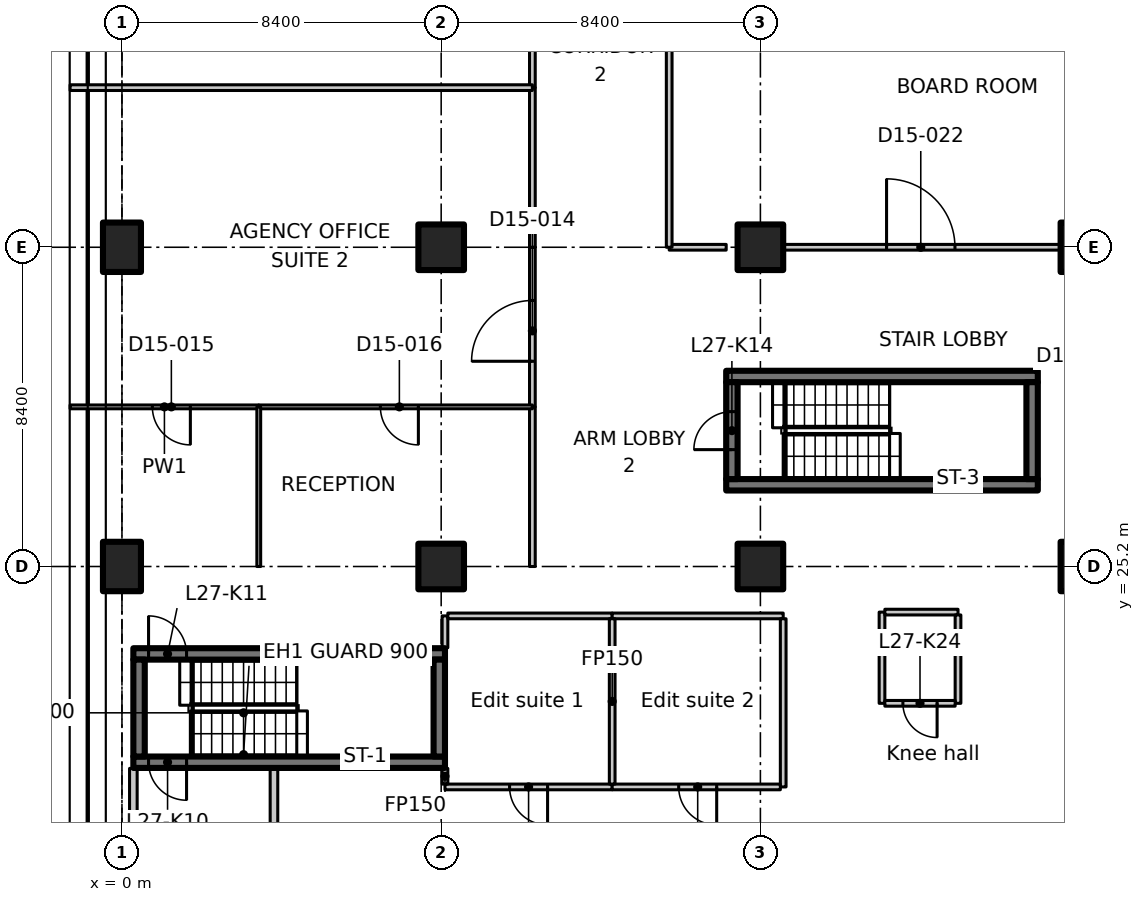
"""IFC4 building model, lengths in metres.
Left out: names, types, materials, properties, quantities, classifications, styles, units other than length and angle.
Written with IfcOpenShell. Run it as: python <this file> out.ifc"""

import sys

from ifc_helpers import new_model, si_unit, direction, frame, frame_2d, origin, origin_2d, place, context, subcontext, project, spatial, polyline, rectangle, outline, extrude, element, fill, save


model = new_model("IFC4")
c1 = context("Model", 3, precision=1e-05, world=origin(), true_north=direction((0.0, 1.0)))
c2 = subcontext(c1, "Body", "Model", "MODEL_VIEW")
j1 = project(units=[si_unit("LENGTHUNIT", "METRE"), si_unit("PLANEANGLEUNIT", "RADIAN")], contexts=[c1])
p1 = place(None, origin())
s1 = spatial("IfcSite", under=j1, at=p1, CompositionType="ELEMENT")
p2 = place(p1, origin())
s2 = spatial("IfcBuilding", under=s1, at=p2, CompositionType="ELEMENT")
p3 = place(p2, frame((0.0, 0.0, 113.3)))
s3 = spatial("IfcBuildingStorey", under=s2, at=p3, CompositionType="ELEMENT", Elevation=113.3)
for number, where, z_axis, x_axis in (
    (1, (0.0, 25.2, 0.0), (0.0, 0.0, 1.0), (1.0, 0.0, 0.0)),
    (2, (0.0, 33.6, 0.0), (0.0, 0.0, 1.0), (1.0, 0.0, 0.0)),
):
    element("IfcColumn", number, at=place(p3, frame(where, z_axis=z_axis, x_axis=x_axis)), inside=s3, PredefinedType="COLUMN", context=c2, shape_type="SweptSolid", body=[
        extrude(rectangle(XDim=1.0, YDim=1.3, at=origin_2d()), origin(), (0.0, 0.0, 1.0), 3.35),
    ])
for number, where, z_axis, x_axis in (
    (3, (8.4, 25.2, 0.0), (0.0, 0.0, 1.0), (1.0, 0.0, 0.0)),
    (4, (8.4, 33.6, 0.0), (0.0, 0.0, 1.0), (1.0, 0.0, 0.0)),
    (5, (16.8, 25.2, 0.0), (0.0, 0.0, 1.0), (1.0, 0.0, 0.0)),
    (6, (16.8, 33.6, 0.0), (0.0, 0.0, 1.0), (1.0, 0.0, 0.0)),
):
    element("IfcColumn", number, at=place(p3, frame(where, z_axis=z_axis, x_axis=x_axis)), inside=s3, PredefinedType="COLUMN", context=c2, shape_type="SweptSolid", body=[
        extrude(rectangle(XDim=1.2, YDim=1.2, at=origin_2d()), origin(), (0.0, 0.0, 1.0), 3.35),
    ])
for number, where, z_axis, x_axis in (
    (7, (25.2, 25.2, 0.0), (0.0, 0.0, 1.0), (1.0, 0.0, 0.0)),
    (8, (25.2, 33.6, 0.0), (0.0, 0.0, 1.0), (1.0, 0.0, 0.0)),
):
    element("IfcColumn", number, at=place(p3, frame(where, z_axis=z_axis, x_axis=x_axis)), inside=s3, PredefinedType="COLUMN", context=c2, shape_type="SweptSolid", body=[
        extrude(rectangle(XDim=1.0, YDim=1.3, at=origin_2d()), origin(), (0.0, 0.0, 1.0), 3.35),
    ])
p4 = place(p3, frame((8.5, 20.05, 0.0), z_axis=(0.0, 0.0, 1.0), x_axis=(-1.0, 0.0, 0.0)))
e9 = element("IfcWall", 9, at=p4, inside=s3, PredefinedType="SHEAR", context=c2, shape_type="SweptSolid", body=[
    extrude(rectangle(XDim=8.2, YDim=0.3, at=frame_2d((4.1, 0.0))), origin(), (0.0, 0.0, 1.0), 3.35),
])
p5 = place(p4, frame((6.8, 0.0, 0.0)))
e10 = element("IfcOpeningElement", 10, at=p5, cuts=e9, PredefinedType="OPENING", context=c2, shape_type="SweptSolid", body=[
    extrude(rectangle(XDim=1.0, YDim=2.1, at=frame_2d((0.5, 1.05))), frame((0.0, 0.16, 0.0), z_axis=(0.0, -1.0, 0.0), x_axis=(1.0, 0.0, 0.0)), (0.0, 0.0, 1.0), 0.32),
])
p6 = place(p3, frame((0.3, 22.9, 0.0), z_axis=(0.0, 0.0, 1.0), x_axis=(1.0, 0.0, 0.0)))
e11 = element("IfcWall", 11, at=p6, inside=s3, PredefinedType="SHEAR", context=c2, shape_type="SweptSolid", body=[
    extrude(rectangle(XDim=8.2, YDim=0.3, at=frame_2d((4.1, 0.0))), origin(), (0.0, 0.0, 1.0), 3.35),
])
p7 = place(p6, frame((0.4, 0.0, 0.0)))
e12 = element("IfcOpeningElement", 12, at=p7, cuts=e11, PredefinedType="OPENING", context=c2, shape_type="SweptSolid", body=[
    extrude(rectangle(XDim=1.0, YDim=2.1, at=frame_2d((0.5, 1.05))), frame((0.0, 0.16, 0.0), z_axis=(0.0, -1.0, 0.0), x_axis=(1.0, 0.0, 0.0)), (0.0, 0.0, 1.0), 0.32),
])
for number, where, z_axis, x_axis in (
    (13, (0.45, 20.2, 0.0), (0.0, 0.0, 1.0), (0.0, 1.0, 0.0)),
    (14, (8.35, 20.2, 0.0), (0.0, 0.0, 1.0), (0.0, 1.0, 0.0)),
):
    element("IfcWall", number, at=place(p3, frame(where, z_axis=z_axis, x_axis=x_axis)), inside=s3, PredefinedType="SHEAR", context=c2, shape_type="SweptSolid", body=[
        extrude(rectangle(XDim=2.55, YDim=0.3, at=frame_2d((1.275, 0.0))), origin(), (0.0, 0.0, 1.0), 3.35),
    ])
for number, where, z_axis, x_axis in (
    (15, (15.9, 27.35, 0.0), (0.0, 0.0, 1.0), (1.0, 0.0, 0.0)),
    (16, (15.9, 30.2, 0.0), (0.0, 0.0, 1.0), (1.0, 0.0, 0.0)),
):
    element("IfcWall", number, at=place(p3, frame(where, z_axis=z_axis, x_axis=x_axis)), inside=s3, PredefinedType="SHEAR", context=c2, shape_type="SweptSolid", body=[
        extrude(rectangle(XDim=8.2, YDim=0.3, at=frame_2d((4.1, 0.0))), origin(), (0.0, 0.0, 1.0), 3.35),
    ])
p8 = place(p3, frame((16.05, 27.5, 0.0), z_axis=(0.0, 0.0, 1.0), x_axis=(0.0, 1.0, 0.0)))
e17 = element("IfcWall", 17, at=p8, inside=s3, PredefinedType="SHEAR", context=c2, shape_type="SweptSolid", body=[
    extrude(rectangle(XDim=2.55, YDim=0.3, at=frame_2d((1.275, 0.0))), origin(), (0.0, 0.0, 1.0), 3.35),
])
p9 = place(p8, frame((0.775, 0.0, 0.0)))
e18 = element("IfcOpeningElement", 18, at=p9, cuts=e17, PredefinedType="OPENING", context=c2, shape_type="SweptSolid", body=[
    extrude(rectangle(XDim=1.0, YDim=2.1, at=frame_2d((0.5, 1.05))), frame((0.0, 0.16, 0.0), z_axis=(0.0, -1.0, 0.0), x_axis=(1.0, 0.0, 0.0)), (0.0, 0.0, 1.0), 0.32),
])
p10 = place(p3, frame((23.95, 27.5, 0.0), z_axis=(0.0, 0.0, 1.0), x_axis=(0.0, 1.0, 0.0)))
e19 = element("IfcWall", 19, at=p10, inside=s3, PredefinedType="SHEAR", context=c2, shape_type="SweptSolid", body=[
    extrude(rectangle(XDim=2.55, YDim=0.3, at=frame_2d((1.275, 0.0))), origin(), (0.0, 0.0, 1.0), 3.35),
])
p11 = place(p3, frame((0.3, 16.812, 0.0), z_axis=(0.0, 0.0, 1.0), x_axis=(0.0, 1.0, 0.0)))
e20 = element("IfcWall", 20, at=p11, inside=s3, PredefinedType="PARTITIONING", context=c2, shape_type="SweptSolid", body=[
    extrude(rectangle(XDim=3.076, YDim=0.2, at=frame_2d((1.538, 0.0))), origin(), (0.0, 0.0, 1.0), 2.98),
])
p12 = place(p3, frame((4.0, 19.888, 0.0), z_axis=(0.0, 0.0, 1.0), x_axis=(0.0, -1.0, 0.0)))
e21 = element("IfcWall", 21, at=p12, inside=s3, PredefinedType="PARTITIONING", context=c2, shape_type="SweptSolid", body=[
    extrude(rectangle(XDim=3.076, YDim=0.2, at=frame_2d((1.538, 0.0))), origin(), (0.0, 0.0, 1.0), 3.35),
])
p13 = place(p12, frame((1.488, 0.0, 0.0)))
e22 = element("IfcOpeningElement", 22, at=p13, cuts=e21, PredefinedType="OPENING", context=c2, shape_type="SweptSolid", body=[
    extrude(rectangle(XDim=1.0, YDim=2.1, at=frame_2d((0.5, 1.05))), frame((0.0, 0.11, 0.0), z_axis=(0.0, -1.0, 0.0), x_axis=(1.0, 0.0, 0.0)), (0.0, 0.0, 1.0), 0.22),
])
p14 = place(p3, frame((12.9, 19.4, 0.0), z_axis=(0.0, 0.0, 1.0), x_axis=(-1.0, 0.0, 0.0)))
e23 = element("IfcWall", 23, at=p14, inside=s3, PredefinedType="PARTITIONING", context=c2, shape_type="SweptSolid", body=[
    extrude(rectangle(XDim=4.4, YDim=0.15, at=frame_2d((2.2, 0.0))), origin(), (0.0, 0.0, 1.0), 3.35),
])
p15 = place(p14, frame((1.7, 0.0, 0.0)))
e24 = element("IfcOpeningElement", 24, at=p15, cuts=e23, PredefinedType="OPENING", context=c2, shape_type="SweptSolid", body=[
    extrude(rectangle(XDim=1.0, YDim=2.1, at=frame_2d((0.5, 1.05))), frame((0.0, 0.085, 0.0), z_axis=(0.0, -1.0, 0.0), x_axis=(1.0, 0.0, 0.0)), (0.0, 0.0, 1.0), 0.17),
])
p16 = place(p3, frame((8.5, 19.475, 0.0), z_axis=(0.0, 0.0, 1.0), x_axis=(0.0, 1.0, 0.0)))
e25 = element("IfcWall", 25, at=p16, inside=s3, PredefinedType="PARTITIONING", context=c2, shape_type="SweptSolid", body=[
    extrude(rectangle(XDim=0.413, YDim=0.15, at=frame_2d((0.207, 0.0))), origin(), (0.0, 0.0, 1.0), 3.35),
])
p17 = place(p3, frame((8.5, 23.062, 0.0), z_axis=(0.0, 0.0, 1.0), x_axis=(0.0, 1.0, 0.0)))
e26 = element("IfcWall", 26, at=p17, inside=s3, PredefinedType="PARTITIONING", context=c2, shape_type="SweptSolid", body=[
    extrude(rectangle(XDim=0.838, YDim=0.15, at=frame_2d((0.419, 0.0))), origin(), (0.0, 0.0, 1.0), 3.35),
])
p18 = place(p3, frame((8.575, 23.9, 0.0), z_axis=(0.0, 0.0, 1.0), x_axis=(1.0, 0.0, 0.0)))
e27 = element("IfcWall", 27, at=p18, inside=s3, PredefinedType="PARTITIONING", context=c2, shape_type="SweptSolid", body=[
    extrude(rectangle(XDim=4.325, YDim=0.15, at=frame_2d((2.163, 0.0))), origin(), (0.0, 0.0, 1.0), 3.35),
])
p19 = place(p3, frame((12.9, 23.9, 0.0), z_axis=(0.0, 0.0, 1.0), x_axis=(1.0, 0.0, 0.0)))
e28 = element("IfcWall", 28, at=p19, inside=s3, PredefinedType="PARTITIONING", context=c2, shape_type="SweptSolid", body=[
    extrude(rectangle(XDim=4.5, YDim=0.15, at=frame_2d((2.25, 0.0))), origin(), (0.0, 0.0, 1.0), 3.35),
])
p20 = place(p3, frame((17.4, 23.825, 0.0), z_axis=(0.0, 0.0, 1.0), x_axis=(0.0, -1.0, 0.0)))
e29 = element("IfcWall", 29, at=p20, inside=s3, PredefinedType="PARTITIONING", context=c2, shape_type="SweptSolid", body=[
    extrude(rectangle(XDim=4.425, YDim=0.15, at=frame_2d((2.212, 0.0))), origin(), (0.0, 0.0, 1.0), 3.35),
])
p21 = place(p3, frame((17.325, 19.4, 0.0), z_axis=(0.0, 0.0, 1.0), x_axis=(-1.0, 0.0, 0.0)))
e30 = element("IfcWall", 30, at=p21, inside=s3, PredefinedType="PARTITIONING", context=c2, shape_type="SweptSolid", body=[
    extrude(rectangle(XDim=4.425, YDim=0.15, at=frame_2d((2.212, 0.0))), origin(), (0.0, 0.0, 1.0), 3.35),
])
p22 = place(p21, frame((1.675, 0.0, 0.0)))
e31 = element("IfcOpeningElement", 31, at=p22, cuts=e30, PredefinedType="OPENING", context=c2, shape_type="SweptSolid", body=[
    extrude(rectangle(XDim=1.0, YDim=2.1, at=frame_2d((0.5, 1.05))), frame((0.0, 0.085, 0.0), z_axis=(0.0, -1.0, 0.0), x_axis=(1.0, 0.0, 0.0)), (0.0, 0.0, 1.0), 0.17),
])
p23 = place(p3, frame((12.9, 23.825, 0.0), z_axis=(0.0, 0.0, 1.0), x_axis=(0.0, -1.0, 0.0)))
e32 = element("IfcWall", 32, at=p23, inside=s3, PredefinedType="PARTITIONING", context=c2, shape_type="SweptSolid", body=[
    extrude(rectangle(XDim=4.35, YDim=0.15, at=frame_2d((2.175, 0.0))), origin(), (0.0, 0.0, 1.0), 3.35),
])
p24 = place(p3, frame((20.0, 21.6, 0.0), z_axis=(0.0, 0.0, 1.0), x_axis=(0.0, 1.0, 0.0)))
e33 = element("IfcWall", 33, at=p24, inside=s3, PredefinedType="PARTITIONING", context=c2, shape_type="SweptSolid", body=[
    extrude(rectangle(XDim=2.4, YDim=0.15, at=frame_2d((1.2, 0.0))), origin(), (0.0, 0.0, 1.0), 3.35),
])
p25 = place(p3, frame((20.075, 24.0, 0.0), z_axis=(0.0, 0.0, 1.0), x_axis=(1.0, 0.0, 0.0)))
e34 = element("IfcWall", 34, at=p25, inside=s3, PredefinedType="PARTITIONING", context=c2, shape_type="SweptSolid", body=[
    extrude(rectangle(XDim=1.925, YDim=0.15, at=frame_2d((0.962, 0.0))), origin(), (0.0, 0.0, 1.0), 3.35),
])
p26 = place(p3, frame((22.0, 23.925, 0.0), z_axis=(0.0, 0.0, 1.0), x_axis=(0.0, -1.0, 0.0)))
e35 = element("IfcWall", 35, at=p26, inside=s3, PredefinedType="PARTITIONING", context=c2, shape_type="SweptSolid", body=[
    extrude(rectangle(XDim=2.325, YDim=0.15, at=frame_2d((1.163, 0.0))), origin(), (0.0, 0.0, 1.0), 3.35),
])
p27 = place(p3, frame((21.925, 21.6, 0.0), z_axis=(0.0, 0.0, 1.0), x_axis=(-1.0, 0.0, 0.0)))
e36 = element("IfcWall", 36, at=p27, inside=s3, PredefinedType="PARTITIONING", context=c2, shape_type="SweptSolid", body=[
    extrude(rectangle(XDim=1.85, YDim=0.15, at=frame_2d((0.925, 0.0))), origin(), (0.0, 0.0, 1.0), 3.35),
])
p28 = place(p27, frame((0.475, 0.0, 0.0)))
e37 = element("IfcOpeningElement", 37, at=p28, cuts=e36, PredefinedType="OPENING", context=c2, shape_type="SweptSolid", body=[
    extrude(rectangle(XDim=0.9, YDim=2.1, at=frame_2d((0.45, 1.05))), frame((0.0, 0.085, 0.0), z_axis=(0.0, -1.0, 0.0), x_axis=(1.0, 0.0, 0.0)), (0.0, 0.0, 1.0), 0.17),
])
p29 = place(p3, frame((10.8, 29.4, 0.0), z_axis=(0.0, 0.0, 1.0), x_axis=(0.0, 1.0, 0.0)))
e38 = element("IfcWall", 38, at=p29, inside=s3, PredefinedType="PARTITIONING", context=c2, shape_type="SweptSolid", body=[
    extrude(rectangle(XDim=4.2, YDim=0.15, at=frame_2d((2.1, 0.0))), origin(), (0.0, 0.0, 1.0), 3.33),
])
p30 = place(p29, frame((1.2, 0.0, 0.0)))
e39 = element("IfcOpeningElement", 39, at=p30, cuts=e38, PredefinedType="OPENING", context=c2, shape_type="SweptSolid", body=[
    extrude(rectangle(XDim=1.6, YDim=2.1, at=frame_2d((0.8, 1.05))), frame((0.0, 0.085, 0.0), z_axis=(0.0, -1.0, 0.0), x_axis=(1.0, 0.0, 0.0)), (0.0, 0.0, 1.0), 0.17),
])
p31 = place(p3, frame((10.8, 25.2, 0.0), z_axis=(0.0, 0.0, 1.0), x_axis=(0.0, 1.0, 0.0)))
e40 = element("IfcWall", 40, at=p31, inside=s3, PredefinedType="PARTITIONING", context=c2, shape_type="SweptSolid", body=[
    extrude(rectangle(XDim=4.2, YDim=0.15, at=frame_2d((2.1, 0.0))), origin(), (0.0, 0.0, 1.0), 3.33),
])
p32 = place(p3, frame((14.4, 33.6, 0.0), z_axis=(0.0, 0.0, 1.0), x_axis=(1.0, 0.0, 0.0)))
e41 = element("IfcWall", 41, at=p32, inside=s3, PredefinedType="PARTITIONING", context=c2, shape_type="SweptSolid", body=[
    extrude(rectangle(XDim=1.5, YDim=0.15, at=frame_2d((0.75, 0.0))), origin(), (0.0, 0.0, 1.0), 3.33),
])
p33 = place(p3, frame((17.42, 33.6, 0.0), z_axis=(0.0, 0.0, 1.0), x_axis=(1.0, 0.0, 0.0)))
e42 = element("IfcWall", 42, at=p33, inside=s3, PredefinedType="PARTITIONING", context=c2, shape_type="SweptSolid", body=[
    extrude(rectangle(XDim=7.26, YDim=0.15, at=frame_2d((3.63, 0.0))), origin(), (0.0, 0.0, 1.0), 3.33),
])
p34 = place(p33, frame((2.7, 0.0, 0.0)))
e43 = element("IfcOpeningElement", 43, at=p34, cuts=e42, PredefinedType="OPENING", context=c2, shape_type="SweptSolid", body=[
    extrude(rectangle(XDim=1.8, YDim=2.1, at=frame_2d((0.9, 1.05))), frame((0.0, 0.085, 0.0), z_axis=(0.0, -1.0, 0.0), x_axis=(1.0, 0.0, 0.0)), (0.0, 0.0, 1.0), 0.17),
])
p35 = place(p3, frame((10.8, 33.6, 0.0), z_axis=(0.0, 0.0, 1.0), x_axis=(0.0, 1.0, 0.0)))
e44 = element("IfcWall", 44, at=p35, inside=s3, PredefinedType="PARTITIONING", context=c2, shape_type="SweptSolid", body=[
    extrude(rectangle(XDim=4.2, YDim=0.15, at=frame_2d((2.1, 0.0))), origin(), (0.0, 0.0, 1.0), 3.33),
])
p36 = place(p3, frame((10.8, 37.8, 0.0), z_axis=(0.0, 0.0, 1.0), x_axis=(0.0, 1.0, 0.0)))
e45 = element("IfcWall", 45, at=p36, inside=s3, PredefinedType="PARTITIONING", context=c2, shape_type="SweptSolid", body=[
    extrude(rectangle(XDim=8.4, YDim=0.15, at=frame_2d((4.2, 0.0))), origin(), (0.0, 0.0, 1.0), 3.33),
])
p37 = place(p36, frame((3.3, 0.0, 0.0)))
e46 = element("IfcOpeningElement", 46, at=p37, cuts=e45, PredefinedType="OPENING", context=c2, shape_type="SweptSolid", body=[
    extrude(rectangle(XDim=1.6, YDim=2.1, at=frame_2d((0.8, 1.05))), frame((0.0, 0.085, 0.0), z_axis=(0.0, -1.0, 0.0), x_axis=(1.0, 0.0, 0.0)), (0.0, 0.0, 1.0), 0.17),
])
p38 = place(p3, frame((14.4, 42.0, 0.0), z_axis=(0.0, 0.0, 1.0), x_axis=(0.0, -1.0, 0.0)))
e47 = element("IfcWall", 47, at=p38, inside=s3, PredefinedType="PARTITIONING", context=c2, shape_type="SweptSolid", body=[
    extrude(rectangle(XDim=8.4, YDim=0.15, at=frame_2d((4.2, 0.0))), origin(), (0.0, 0.0, 1.0), 3.33),
])
p39 = place(p3, frame((3.6, 29.4, 0.0), z_axis=(0.0, 0.0, 1.0), x_axis=(-1.0, 0.0, 0.0)))
e48 = element("IfcWall", 48, at=p39, inside=s3, PredefinedType="PARTITIONING", context=c2, shape_type="SweptSolid", body=[
    extrude(outline(polyline([(0.0, 0.0), (4.965, 0.0), (4.965, 3.33), (4.7, 3.33), (4.05, 3.33), (4.048, 2.98), (3.152, 2.98), (3.15, 3.33), (0.0, 3.33), (0.0, 0.0)])), frame((0.0, 0.05, 0.0), z_axis=(0.0, -1.0, 0.0), x_axis=(1.0, 0.0, 0.0)), (0.0, 0.0, 1.0), 0.1),
])
p40 = place(p39, frame((1.8, 0.0, 0.0)))
e49 = element("IfcOpeningElement", 49, at=p40, cuts=e48, PredefinedType="OPENING", context=c2, shape_type="SweptSolid", body=[
    extrude(rectangle(XDim=1.0, YDim=2.1, at=frame_2d((0.5, 1.05))), frame((0.0, 0.06, 0.0), z_axis=(0.0, -1.0, 0.0), x_axis=(1.0, 0.0, 0.0)), (0.0, 0.0, 1.0), 0.12),
])
p41 = place(p3, frame((10.8, 29.4, 0.0), z_axis=(0.0, 0.0, 1.0), x_axis=(-1.0, 0.0, 0.0)))
e50 = element("IfcWall", 50, at=p41, inside=s3, PredefinedType="PARTITIONING", context=c2, shape_type="SweptSolid", body=[
    extrude(rectangle(XDim=7.2, YDim=0.1, at=frame_2d((3.6, 0.0))), origin(), (0.0, 0.0, 1.0), 3.33),
])
p42 = place(p41, frame((3.0, 0.0, 0.0)))
e51 = element("IfcOpeningElement", 51, at=p42, cuts=e50, PredefinedType="OPENING", context=c2, shape_type="SweptSolid", body=[
    extrude(rectangle(XDim=1.0, YDim=2.1, at=frame_2d((0.5, 1.05))), frame((0.0, 0.06, 0.0), z_axis=(0.0, -1.0, 0.0), x_axis=(1.0, 0.0, 0.0)), (0.0, 0.0, 1.0), 0.12),
])
p43 = place(p3, frame((-1.365, 37.8, 0.0), z_axis=(0.0, 0.0, 1.0), x_axis=(1.0, 0.0, 0.0)))
e52 = element("IfcWall", 52, at=p43, inside=s3, PredefinedType="PARTITIONING", context=c2, shape_type="SweptSolid", body=[
    extrude(outline(polyline([(0.0, 0.0), (12.165, 0.0), (12.165, 3.33), (1.815, 3.33), (1.813, 2.98), (0.917, 2.98), (0.915, 3.33), (0.265, 3.33), (0.0, 3.33), (0.0, 0.0)])), frame((0.0, 0.075, 0.0), z_axis=(0.0, -1.0, 0.0), x_axis=(1.0, 0.0, 0.0)), (0.0, 0.0, 1.0), 0.15),
])
p44 = place(p3, frame((3.6, 29.4, 0.0), z_axis=(0.0, 0.0, 1.0), x_axis=(0.0, -1.0, 0.0)))
e53 = element("IfcWall", 53, at=p44, inside=s3, PredefinedType="PARTITIONING", context=c2, shape_type="SweptSolid", body=[
    extrude(rectangle(XDim=4.2, YDim=0.1, at=frame_2d((2.1, 0.0))), origin(), (0.0, 0.0, 1.0), 3.33),
])
p45 = place(p5, origin())
e54 = element("IfcDoor", 54, at=p45, inside=s3, OperationType="SINGLE_SWING_LEFT", PredefinedType="DOOR", context=c2, shape_type="SweptSolid", body=[
    extrude(rectangle(XDim=1.0, YDim=2.1, at=frame_2d((0.5, 1.05))), frame((0.0, 0.025, 0.0), z_axis=(0.0, -1.0, 0.0), x_axis=(1.0, 0.0, 0.0)), (0.0, 0.0, 1.0), 0.05),
])
fill(e10, e54)
p46 = place(p7, origin())
e55 = element("IfcDoor", 55, at=p46, inside=s3, OperationType="SINGLE_SWING_RIGHT", PredefinedType="DOOR", context=c2, shape_type="SweptSolid", body=[
    extrude(rectangle(XDim=1.0, YDim=2.1, at=frame_2d((0.5, 1.05))), frame((0.0, 0.025, 0.0), z_axis=(0.0, -1.0, 0.0), x_axis=(1.0, 0.0, 0.0)), (0.0, 0.0, 1.0), 0.05),
])
fill(e12, e55)
p47 = place(p9, origin())
e56 = element("IfcDoor", 56, at=p47, inside=s3, OperationType="SINGLE_SWING_LEFT", PredefinedType="DOOR", context=c2, shape_type="SweptSolid", body=[
    extrude(rectangle(XDim=1.0, YDim=2.1, at=frame_2d((0.5, 1.05))), frame((0.0, 0.025, 0.0), z_axis=(0.0, -1.0, 0.0), x_axis=(1.0, 0.0, 0.0)), (0.0, 0.0, 1.0), 0.05),
])
fill(e18, e56)
p48 = place(p28, origin())
e57 = element("IfcDoor", 57, at=p48, inside=s3, OperationType="SINGLE_SWING_LEFT", PredefinedType="DOOR", context=c2, shape_type="SweptSolid", body=[
    extrude(rectangle(XDim=0.9, YDim=2.1, at=frame_2d((0.45, 1.05))), frame((0.0, 0.025, 0.0), z_axis=(0.0, -1.0, 0.0), x_axis=(1.0, 0.0, 0.0)), (0.0, 0.0, 1.0), 0.05),
])
fill(e37, e57)
p49 = place(p15, origin())
e58 = element("IfcDoor", 58, at=p49, inside=s3, OperationType="SINGLE_SWING_RIGHT", PredefinedType="DOOR", context=c2, shape_type="SweptSolid", body=[
    extrude(rectangle(XDim=1.0, YDim=2.1, at=frame_2d((0.5, 1.05))), frame((0.0, 0.025, 0.0), z_axis=(0.0, -1.0, 0.0), x_axis=(1.0, 0.0, 0.0)), (0.0, 0.0, 1.0), 0.05),
])
fill(e24, e58)
p50 = place(p22, origin())
e59 = element("IfcDoor", 59, at=p50, inside=s3, OperationType="SINGLE_SWING_LEFT", PredefinedType="DOOR", context=c2, shape_type="SweptSolid", body=[
    extrude(rectangle(XDim=1.0, YDim=2.1, at=frame_2d((0.5, 1.05))), frame((0.0, 0.025, 0.0), z_axis=(0.0, -1.0, 0.0), x_axis=(1.0, 0.0, 0.0)), (0.0, 0.0, 1.0), 0.05),
])
fill(e31, e59)
p51 = place(p30, origin())
e60 = element("IfcDoor", 60, at=p51, inside=s3, OperationType="DOUBLE_DOOR_SINGLE_SWING", PredefinedType="DOOR", context=c2, shape_type="SweptSolid", body=[
    extrude(rectangle(XDim=1.6, YDim=2.1, at=frame_2d((0.8, 1.05))), frame((0.0, 0.025, 0.0), z_axis=(0.0, -1.0, 0.0), x_axis=(1.0, 0.0, 0.0)), (0.0, 0.0, 1.0), 0.05),
])
fill(e39, e60)
p52 = place(p40, origin())
e61 = element("IfcDoor", 61, at=p52, inside=s3, OperationType="SINGLE_SWING_LEFT", PredefinedType="DOOR", context=c2, shape_type="SweptSolid", body=[
    extrude(rectangle(XDim=1.0, YDim=2.1, at=frame_2d((0.5, 1.05))), frame((0.0, 0.025, 0.0), z_axis=(0.0, -1.0, 0.0), x_axis=(1.0, 0.0, 0.0)), (0.0, 0.0, 1.0), 0.05),
])
fill(e49, e61)
p53 = place(p42, origin())
e62 = element("IfcDoor", 62, at=p53, inside=s3, OperationType="SINGLE_SWING_LEFT", PredefinedType="DOOR", context=c2, shape_type="SweptSolid", body=[
    extrude(rectangle(XDim=1.0, YDim=2.1, at=frame_2d((0.5, 1.05))), frame((0.0, 0.025, 0.0), z_axis=(0.0, -1.0, 0.0), x_axis=(1.0, 0.0, 0.0)), (0.0, 0.0, 1.0), 0.05),
])
fill(e51, e62)
p54 = place(p34, origin())
e63 = element("IfcDoor", 63, at=p54, inside=s3, OperationType="DOUBLE_DOOR_SINGLE_SWING", PredefinedType="DOOR", context=c2, shape_type="SweptSolid", body=[
    extrude(rectangle(XDim=1.8, YDim=2.1, at=frame_2d((0.9, 1.05))), frame((0.0, 0.025, 0.0), z_axis=(0.0, -1.0, 0.0), x_axis=(1.0, 0.0, 0.0)), (0.0, 0.0, 1.0), 0.05),
])
fill(e43, e63)
save(model, sys.argv[1])
